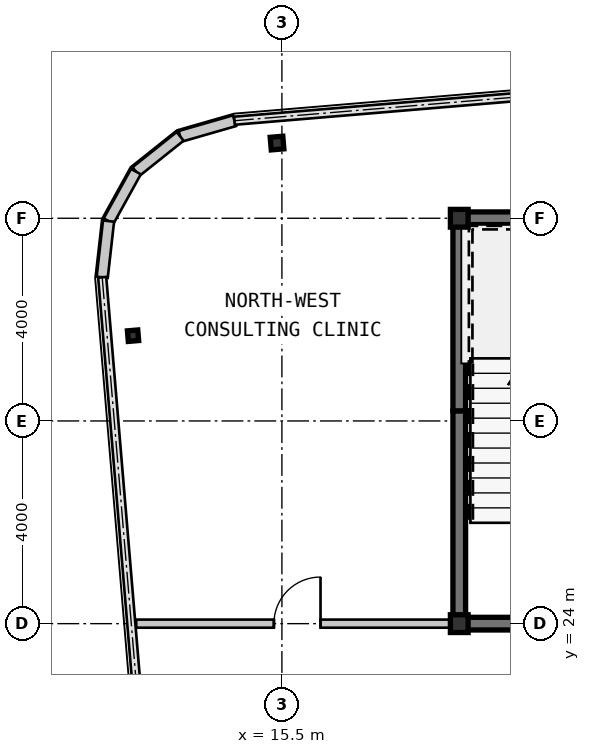
"""IFC4 building model, lengths in metres.
Left out: names, types, materials, properties, quantities, classifications, styles, units other than length and angle.
Written with IfcOpenShell. Run it as: python <this file> out.ifc"""

import sys

from ifc_helpers import new_model, si_unit, direction, frame, frame_2d, origin, origin_2d, place, context, subcontext, project, spatial, rectangle, hollow_rectangle, i_section, extrude, source, transform, mapped, element, fill, save


model = new_model("IFC4")
c1 = context("Model", 3, precision=1e-05, world=origin(), true_north=direction((0.0, 1.0)))
c2 = subcontext(c1, "Body", "Model", "MODEL_VIEW")
j1 = project(units=[si_unit("LENGTHUNIT", "METRE"), si_unit("PLANEANGLEUNIT", "RADIAN")], contexts=[c1])
p1 = place(None, origin())
s1 = spatial("IfcSite", under=j1, at=p1, CompositionType="ELEMENT")
p2 = place(p1, origin())
s2 = spatial("IfcBuilding", under=s1, at=p2, CompositionType="ELEMENT")
p3 = place(p2, frame((0.0, 0.0, 191.45)))
s3 = spatial("IfcBuildingStorey", under=s2, at=p3, CompositionType="ELEMENT", Elevation=191.45)
m1 = source(origin(), c2, "Body", "SweptSolid", [
    extrude(hollow_rectangle(XDim=0.35, YDim=0.35, WallThickness=0.016, at=origin_2d()), origin(), (0.0, 0.0, 1.0), 3.15),
])
for number, where, z_axis, x_axis in (
    (1, (19.0, 24.0, 0.0), (0.0, 0.0, 1.0), (1.0, 0.0, 0.0)),
    (2, (19.0, 32.0, 0.0), (0.0, 0.0, 1.0), (1.0, 0.0, 0.0)),
):
    element("IfcColumn", number, at=place(p3, frame(where, z_axis=z_axis, x_axis=x_axis)), inside=s3, PredefinedType="COLUMN", context=c2, shape_type="MappedRepresentation", body=[
        mapped(m1, transform((0.0, 0.0, 0.0), scale=1.0)),
    ])
m2 = source(origin(), c2, "Body", "SweptSolid", [
    extrude(hollow_rectangle(XDim=0.25, YDim=0.25, WallThickness=0.01, at=origin_2d()), origin(), (0.0, 0.0, 1.0), 3.15),
])
p4 = place(p3, frame((15.404, 33.484, 0.0), z_axis=(0.0, 0.0, 1.0), x_axis=(0.99649285925, 0.083677843332, 0.0)))
e3 = element("IfcColumn", 3, at=p4, inside=s3, PredefinedType="COLUMN", context=c2, shape_type="MappedRepresentation", body=[
    mapped(m2, transform((0.0, 0.0, 0.0), scale=1.0)),
])
m3 = source(origin(), c2, "Body", "SweptSolid", [
    extrude(i_section(OverallWidth=0.205, OverallDepth=0.21, WebThickness=0.009, FlangeThickness=0.014, at=origin_2d()), origin(), (0.0, 0.0, 1.0), 3.15),
])
p5 = place(p3, frame((12.562, 29.682, 0.0), z_axis=(0.0, 0.0, 1.0), x_axis=(0.99649285925, 0.083677843332, 0.0)))
e4 = element("IfcColumn", 4, at=p5, inside=s3, PredefinedType="COLUMN", context=c2, shape_type="MappedRepresentation", body=[
    mapped(m3, transform((0.0, 0.0, 0.0), scale=1.0)),
])
m4 = source(origin(), c2, "Body", "SweptSolid", [
    extrude(rectangle(XDim=1.116, YDim=0.22, at=frame_2d((0.558, 0.0))), origin(), (0.0, 0.0, 1.0), 2.93),
])
p6 = place(p3, frame((14.564, 33.925, 0.0), z_axis=(0.0, 0.0, 1.0), x_axis=(-0.961010464297, -0.276512002475, 0.0)))
e5 = element("IfcWall", 5, at=p6, inside=s3, PredefinedType="SOLIDWALL", context=c2, shape_type="MappedRepresentation", body=[
    mapped(m4, transform((0.0, 0.0, 0.0), scale=1.0)),
])
m5 = source(origin(), c2, "Body", "SweptSolid", [
    extrude(rectangle(XDim=1.116, YDim=0.22, at=frame_2d((0.558, 0.0))), origin(), (0.0, 0.0, 1.0), 2.93),
])
p7 = place(p3, frame((13.491, 33.616, 0.0), z_axis=(0.0, 0.0, 1.0), x_axis=(-0.782062884215, -0.623199522732, 0.0)))
e6 = element("IfcWall", 6, at=p7, inside=s3, PredefinedType="SOLIDWALL", context=c2, shape_type="MappedRepresentation", body=[
    mapped(m5, transform((0.0, 0.0, 0.0), scale=1.0)),
])
for number, where, z_axis, x_axis in (
    (7, (12.619, 32.921, 0.0), (0.0, 0.0, 1.0), (-0.484, -0.875, 0.0)),
    (8, (12.079, 31.944, 0.0), (0.0, 0.0, 1.0), (-0.112, -0.994, 0.0)),
):
    element("IfcWall", number, at=place(p3, frame(where, z_axis=z_axis, x_axis=x_axis)), inside=s3, PredefinedType="SOLIDWALL", context=c2, shape_type="MappedRepresentation", body=[
        mapped(m4, transform((0.0, 0.0, 0.0), scale=1.0)),
    ])
m6 = source(origin(), c2, "Body", "SweptSolid", [
    extrude(rectangle(XDim=9.125, YDim=0.25, at=frame_2d((4.562, 0.0))), origin(), (0.0, 0.0, 1.0), 2.93),
])
p8 = place(p3, frame((18.875, 32.0, 0.0), z_axis=(0.0, 0.0, 1.0), x_axis=(1.0, 0.0, 0.0)))
e9 = element("IfcWall", 9, at=p8, inside=s3, PredefinedType="SHEAR", context=c2, shape_type="MappedRepresentation", body=[
    mapped(m6, transform((0.0, 0.0, 0.0), scale=1.0)),
])
m7 = source(origin(), c2, "Body", "SweptSolid", [
    extrude(rectangle(XDim=4.075, YDim=0.25, at=frame_2d((2.038, 0.0))), origin(), (0.0, 0.0, 1.0), 2.93),
])
p9 = place(p3, frame((19.0, 24.125, 0.0), z_axis=(0.0, 0.0, 1.0), x_axis=(0.0, 1.0, 0.0)))
e10 = element("IfcWall", 10, at=p9, inside=s3, PredefinedType="SHEAR", context=c2, shape_type="MappedRepresentation", body=[
    mapped(m7, transform((0.0, 0.0, 0.0), scale=1.0)),
])
m8 = source(origin(), c2, "Body", "SweptSolid", [
    extrude(rectangle(XDim=3.675, YDim=0.25, at=frame_2d((1.837, 0.0))), origin(), (0.0, 0.0, 1.0), 2.93),
])
p10 = place(p3, frame((19.0, 28.2, 0.0), z_axis=(0.0, 0.0, 1.0), x_axis=(0.0, 1.0, 0.0)))
e11 = element("IfcWall", 11, at=p10, inside=s3, PredefinedType="SHEAR", context=c2, shape_type="MappedRepresentation", body=[
    mapped(m8, transform((0.0, 0.0, 0.0), scale=1.0)),
])
m9 = source(origin(), c2, "Body", "SweptSolid", [
    extrude(rectangle(XDim=4.85, YDim=0.25, at=frame_2d((2.425, 0.0))), origin(), (0.0, 0.0, 1.0), 2.93),
])
p11 = place(p3, frame((18.875, 24.0, 0.0), z_axis=(0.0, 0.0, 1.0), x_axis=(1.0, 0.0, 0.0)))
e12 = element("IfcWall", 12, at=p11, inside=s3, PredefinedType="SHEAR", context=c2, shape_type="MappedRepresentation", body=[
    mapped(m9, transform((0.0, 0.0, 0.0), scale=1.0)),
])
m10 = source(origin(), c2, "Body", "SweptSolid", [
    extrude(rectangle(XDim=6.251, YDim=0.16, at=frame_2d((3.125, 0.0))), origin(), (0.0, 0.0, 1.0), 2.93),
])
p12 = place(p3, frame((12.624, 24.0, 0.0), z_axis=(0.0, 0.0, 1.0), x_axis=(1.0, 0.0, 0.0)))
e13 = element("IfcWall", 13, at=p12, inside=s3, PredefinedType="PARTITIONING", context=c2, shape_type="MappedRepresentation", body=[
    mapped(m10, transform((0.0, 0.0, 0.0), scale=1.0)),
])
m11 = source(origin(), c2, "Body", "SweptSolid", [
    extrude(rectangle(XDim=0.92, YDim=2.1, at=frame_2d((0.46, 1.05))), frame((0.0, 0.09, 0.0), z_axis=(0.0, -1.0, 0.0), x_axis=(1.0, 0.0, 0.0)), (0.0, 0.0, 1.0), 0.18),
])
p13 = place(p12, frame((2.718, 0.0, 0.0)))
e14 = element("IfcOpeningElement", 14, at=p13, cuts=e13, PredefinedType="OPENING", context=c2, shape_type="MappedRepresentation", body=[
    mapped(m11, transform((0.0, 0.0, 0.0), scale=1.0)),
])
m12 = source(origin(), c2, "Body", "SweptSolid", [
    extrude(rectangle(XDim=0.92, YDim=2.1, at=frame_2d((0.46, 1.05))), frame((0.0, 0.025, 0.0), z_axis=(0.0, -1.0, 0.0), x_axis=(1.0, 0.0, 0.0)), (0.0, 0.0, 1.0), 0.05),
])
p14 = place(p13, origin())
e15 = element("IfcDoor", 15, at=p14, inside=s3, OperationType="SINGLE_SWING_RIGHT", PredefinedType="DOOR", context=c2, shape_type="MappedRepresentation", body=[
    mapped(m12, transform((0.0, 0.0, 0.0), scale=1.0)),
])
fill(e14, e15)
save(model, sys.argv[1])
